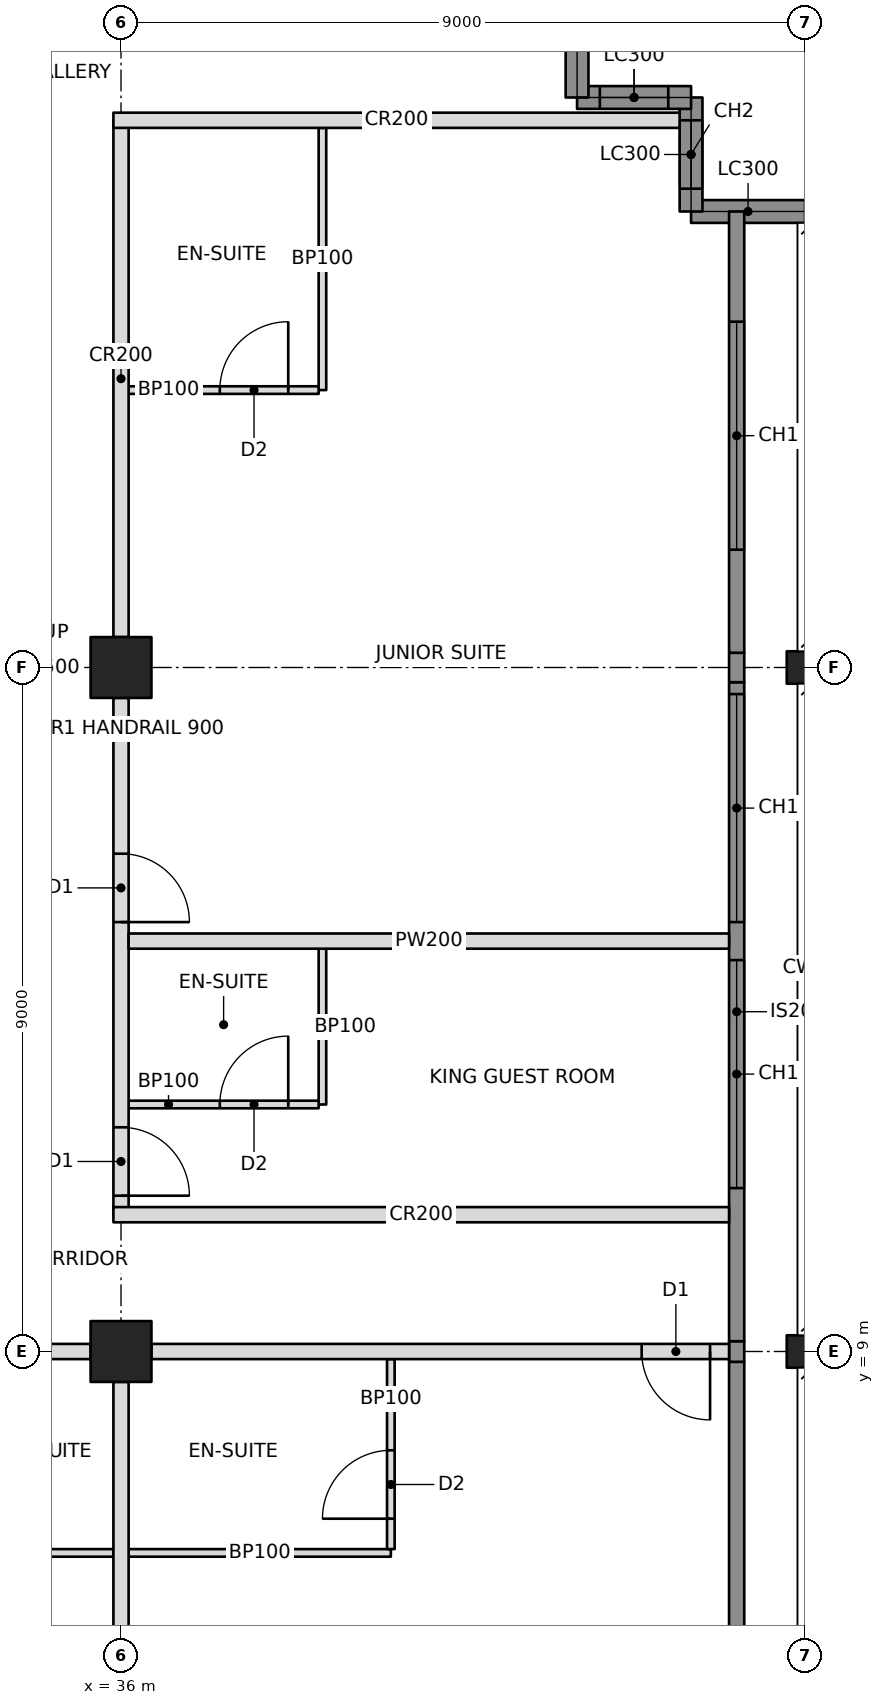
"""IFC4 building model, lengths in metres.
Left out: names, types, materials, properties, quantities, classifications, styles, units other than length and angle.
Written with IfcOpenShell. Run it as: python <this file> out.ifc"""

import sys

from ifc_helpers import new_model, si_unit, direction, frame, frame_2d, origin, origin_2d, place, context, subcontext, project, spatial, rectangle, hollow_rectangle, i_section, extrude, element, fill, save


model = new_model("IFC4")
c1 = context("Model", 3, precision=1e-05, world=origin(), true_north=direction((0.0, 1.0)))
c2 = subcontext(c1, "Body", "Model", "MODEL_VIEW")
j1 = project(units=[si_unit("LENGTHUNIT", "METRE"), si_unit("PLANEANGLEUNIT", "RADIAN")], contexts=[c1])
p1 = place(None, origin())
s1 = spatial("IfcSite", under=j1, at=p1, CompositionType="ELEMENT")
p2 = place(p1, origin())
s2 = spatial("IfcBuilding", under=s1, at=p2, CompositionType="ELEMENT")
p3 = place(p2, frame((0.0, 0.0, 208.0)))
s3 = spatial("IfcBuildingStorey", under=s2, at=p3, CompositionType="ELEMENT", Elevation=208.0)
for number, where, z_axis, x_axis in (
    (1, (36.0, 9.0, 0.0), (0.0, 0.0, 1.0), (0.0, 1.0, 0.0)),
    (2, (36.0, 18.0, 0.0), (0.0, 0.0, 1.0), (0.0, 1.0, 0.0)),
):
    element("IfcColumn", number, at=place(p3, frame(where, z_axis=z_axis, x_axis=x_axis)), inside=s3, PredefinedType="COLUMN", context=c2, shape_type="SweptSolid", body=[
        extrude(hollow_rectangle(XDim=0.8, YDim=0.8, WallThickness=0.05, at=origin_2d()), origin(), (0.0, 0.0, 1.0), 3.4),
    ])
for number, where, z_axis, x_axis in (
    (3, (45.0, 9.0, 0.0), (0.0, 0.0, 1.0), (0.0, 1.0, 0.0)),
    (4, (45.0, 18.0, 0.0), (0.0, 0.0, 1.0), (0.0, 1.0, 0.0)),
):
    element("IfcColumn", number, at=place(p3, frame(where, z_axis=z_axis, x_axis=x_axis)), inside=s3, PredefinedType="COLUMN", context=c2, shape_type="SweptSolid", body=[
        extrude(i_section(OverallWidth=0.427, OverallDepth=0.483, WebThickness=0.051, FlangeThickness=0.082, at=origin_2d()), origin(), (0.0, 0.0, 1.0), 3.4),
    ])
p4 = place(p3, frame((45.0, 24.0, 0.0), z_axis=(0.0, 0.0, 1.0), x_axis=(-1.0, 0.0, 0.0)))
e5 = element("IfcWall", 5, at=p4, inside=s3, PredefinedType="SOLIDWALL", context=c2, shape_type="SweptSolid", body=[
    extrude(rectangle(XDim=1.5, YDim=0.3, at=frame_2d((0.75, 0.0))), origin(), (0.0, 0.0, 1.0), 2.42),
])
p5 = place(p3, frame((43.5, 24.0, 0.0), z_axis=(0.0, 0.0, 1.0), x_axis=(0.0, 1.0, 0.0)))
e6 = element("IfcWall", 6, at=p5, inside=s3, PredefinedType="SOLIDWALL", context=c2, shape_type="SweptSolid", body=[
    extrude(rectangle(XDim=1.5, YDim=0.3, at=frame_2d((0.75, 0.0))), origin(), (0.0, 0.0, 1.0), 3.2),
])
p6 = place(p5, frame((0.3, 0.0, 0.6)))
e7 = element("IfcOpeningElement", 7, at=p6, cuts=e6, PredefinedType="OPENING", context=c2, shape_type="SweptSolid", body=[
    extrude(rectangle(XDim=0.9, YDim=2.2, at=frame_2d((0.45, 1.1))), frame((0.0, 0.16, 0.0), z_axis=(0.0, -1.0, 0.0), x_axis=(1.0, 0.0, 0.0)), (0.0, 0.0, 1.0), 0.32),
])
p7 = place(p3, frame((43.5, 25.5, 0.0), z_axis=(0.0, 0.0, 1.0), x_axis=(-1.0, 0.0, 0.0)))
e8 = element("IfcWall", 8, at=p7, inside=s3, PredefinedType="SOLIDWALL", context=c2, shape_type="SweptSolid", body=[
    extrude(rectangle(XDim=1.5, YDim=0.3, at=frame_2d((0.75, 0.0))), origin(), (0.0, 0.0, 1.0), 3.2),
])
p8 = place(p7, frame((0.3, 0.0, 0.6)))
e9 = element("IfcOpeningElement", 9, at=p8, cuts=e8, PredefinedType="OPENING", context=c2, shape_type="SweptSolid", body=[
    extrude(rectangle(XDim=0.9, YDim=2.2, at=frame_2d((0.45, 1.1))), frame((0.0, 0.16, 0.0), z_axis=(0.0, -1.0, 0.0), x_axis=(1.0, 0.0, 0.0)), (0.0, 0.0, 1.0), 0.32),
])
p9 = place(p3, frame((42.0, 25.5, 0.0), z_axis=(0.0, 0.0, 1.0), x_axis=(0.0, 1.0, 0.0)))
e10 = element("IfcWall", 10, at=p9, inside=s3, PredefinedType="SOLIDWALL", context=c2, shape_type="SweptSolid", body=[
    extrude(rectangle(XDim=1.5, YDim=0.3, at=frame_2d((0.75, 0.0))), origin(), (0.0, 0.0, 1.0), 2.42),
])
p10 = place(p3, frame((27.4, 9.0, 0.0), z_axis=(0.0, 0.0, 1.0), x_axis=(1.0, 0.0, 0.0)))
e11 = element("IfcWall", 11, at=p10, inside=s3, PredefinedType="PARTITIONING", context=c2, shape_type="SweptSolid", body=[
    extrude(rectangle(XDim=8.2, YDim=0.2, at=frame_2d((4.1, 0.0))), origin(), (0.0, 0.0, 1.0), 2.405),
])
p11 = place(p10, frame((4.35, 0.0, 0.0)))
e12 = element("IfcOpeningElement", 12, at=p11, cuts=e11, PredefinedType="OPENING", context=c2, shape_type="SweptSolid", body=[
    extrude(rectangle(XDim=0.9, YDim=2.1, at=frame_2d((0.45, 1.05))), frame((0.0, 0.11, 0.0), z_axis=(0.0, -1.0, 0.0), x_axis=(1.0, 0.0, 0.0)), (0.0, 0.0, 1.0), 0.22),
])
p12 = place(p3, frame((36.4, 9.0, 0.0), z_axis=(0.0, 0.0, 1.0), x_axis=(1.0, 0.0, 0.0)))
e13 = element("IfcWall", 13, at=p12, inside=s3, PredefinedType="PARTITIONING", context=c2, shape_type="SweptSolid", body=[
    extrude(rectangle(XDim=7.6, YDim=0.2, at=frame_2d((3.8, 0.0))), origin(), (0.0, 0.0, 1.0), 2.438),
])
p13 = place(p12, frame((6.45, 0.0, 0.0)))
e14 = element("IfcOpeningElement", 14, at=p13, cuts=e13, PredefinedType="OPENING", context=c2, shape_type="SweptSolid", body=[
    extrude(rectangle(XDim=0.9, YDim=2.1, at=frame_2d((0.45, 1.05))), frame((0.0, 0.11, 0.0), z_axis=(0.0, -1.0, 0.0), x_axis=(1.0, 0.0, 0.0)), (0.0, 0.0, 1.0), 0.22),
])
p14 = place(p3, frame((36.0, 10.8, 0.0), z_axis=(0.0, 0.0, 1.0), x_axis=(0.0, 1.0, 0.0)))
e15 = element("IfcWall", 15, at=p14, inside=s3, PredefinedType="PARTITIONING", context=c2, shape_type="SweptSolid", body=[
    extrude(rectangle(XDim=6.8, YDim=0.2, at=frame_2d((3.4, 0.0))), origin(), (0.0, 0.0, 1.0), 2.405),
])
p15 = place(p14, frame((0.25, 0.0, 0.0)))
e16 = element("IfcOpeningElement", 16, at=p15, cuts=e15, PredefinedType="OPENING", context=c2, shape_type="SweptSolid", body=[
    extrude(rectangle(XDim=0.9, YDim=2.1, at=frame_2d((0.45, 1.05))), frame((0.0, 0.11, 0.0), z_axis=(0.0, -1.0, 0.0), x_axis=(1.0, 0.0, 0.0)), (0.0, 0.0, 1.0), 0.22),
])
p16 = place(p14, frame((3.85, 0.0, 0.0)))
e17 = element("IfcOpeningElement", 17, at=p16, cuts=e15, PredefinedType="OPENING", context=c2, shape_type="SweptSolid", body=[
    extrude(rectangle(XDim=0.9, YDim=2.1, at=frame_2d((0.45, 1.05))), frame((0.0, 0.11, 0.0), z_axis=(0.0, -1.0, 0.0), x_axis=(1.0, 0.0, 0.0)), (0.0, 0.0, 1.0), 0.22),
])
p17 = place(p3, frame((36.0, 18.4, 0.0), z_axis=(0.0, 0.0, 1.0), x_axis=(0.0, 1.0, 0.0)))
e18 = element("IfcWall", 18, at=p17, inside=s3, PredefinedType="PARTITIONING", context=c2, shape_type="SweptSolid", body=[
    extrude(rectangle(XDim=6.8, YDim=0.2, at=frame_2d((3.4, 0.0))), origin(), (0.0, 0.0, 1.0), 2.405),
])
p18 = place(p3, frame((35.9, 10.8, 0.0), z_axis=(0.0, 0.0, 1.0), x_axis=(1.0, 0.0, 0.0)))
e19 = element("IfcWall", 19, at=p18, inside=s3, PredefinedType="PARTITIONING", context=c2, shape_type="SweptSolid", body=[
    extrude(rectangle(XDim=8.1, YDim=0.2, at=frame_2d((4.05, 0.0))), origin(), (0.0, 0.0, 1.0), 2.404),
])
p19 = place(p3, frame((35.9, 25.2, 0.0), z_axis=(0.0, 0.0, 1.0), x_axis=(1.0, 0.0, 0.0)))
e20 = element("IfcWall", 20, at=p19, inside=s3, PredefinedType="PARTITIONING", context=c2, shape_type="SweptSolid", body=[
    extrude(rectangle(XDim=7.45, YDim=0.2, at=frame_2d((3.725, 0.0))), origin(), (0.0, 0.0, 1.0), 2.404),
])
p20 = place(p3, frame((36.0, 8.6, 0.0), z_axis=(0.0, 0.0, 1.0), x_axis=(0.0, -1.0, 0.0)))
e21 = element("IfcWall", 21, at=p20, inside=s3, PredefinedType="PARTITIONING", context=c2, shape_type="SweptSolid", body=[
    extrude(rectangle(XDim=7.6, YDim=0.2, at=frame_2d((3.8, 0.0))), origin(), (0.0, 0.0, 1.0), 2.438),
])
p21 = place(p3, frame((32.95, 6.35, 0.0), z_axis=(0.0, 0.0, 1.0), x_axis=(1.0, 0.0, 0.0)))
e22 = element("IfcWall", 22, at=p21, inside=s3, PredefinedType="PARTITIONING", context=c2, shape_type="SweptSolid", body=[
    extrude(rectangle(XDim=2.95, YDim=0.1, at=frame_2d((1.475, 0.0))), origin(), (0.0, 0.0, 1.0), 2.438),
])
p22 = place(p3, frame((36.1, 6.35, 0.0), z_axis=(0.0, 0.0, 1.0), x_axis=(1.0, 0.0, 0.0)))
e23 = element("IfcWall", 23, at=p22, inside=s3, PredefinedType="PARTITIONING", context=c2, shape_type="SweptSolid", body=[
    extrude(rectangle(XDim=3.45, YDim=0.1, at=frame_2d((1.725, 0.0))), origin(), (0.0, 0.0, 1.0), 2.438),
])
p23 = place(p3, frame((39.55, 8.9, 0.0), z_axis=(0.0, 0.0, 1.0), x_axis=(0.0, -1.0, 0.0)))
e24 = element("IfcWall", 24, at=p23, inside=s3, PredefinedType="PARTITIONING", context=c2, shape_type="SweptSolid", body=[
    extrude(rectangle(XDim=2.5, YDim=0.1, at=frame_2d((1.25, 0.0))), origin(), (0.0, 0.0, 1.0), 2.438),
])
p24 = place(p23, frame((1.2, 0.0, 0.0)))
e25 = element("IfcOpeningElement", 25, at=p24, cuts=e24, PredefinedType="OPENING", context=c2, shape_type="SweptSolid", body=[
    extrude(rectangle(XDim=0.9, YDim=2.1, at=frame_2d((0.45, 1.05))), frame((0.0, 0.06, 0.0), z_axis=(0.0, -1.0, 0.0), x_axis=(1.0, 0.0, 0.0)), (0.0, 0.0, 1.0), 0.12),
])
p25 = place(p3, frame((36.1, 14.4, 0.0), z_axis=(0.0, 0.0, 1.0), x_axis=(1.0, 0.0, 0.0)))
e26 = element("IfcWall", 26, at=p25, inside=s3, PredefinedType="PARTITIONING", context=c2, shape_type="SweptSolid", body=[
    extrude(rectangle(XDim=7.9, YDim=0.2, at=frame_2d((3.95, 0.0))), origin(), (0.0, 0.0, 1.0), 2.404),
])
p26 = place(p3, frame((38.65, 12.25, 0.0), z_axis=(0.0, 0.0, 1.0), x_axis=(0.0, 1.0, 0.0)))
e27 = element("IfcWall", 27, at=p26, inside=s3, PredefinedType="PARTITIONING", context=c2, shape_type="SweptSolid", body=[
    extrude(rectangle(XDim=2.05, YDim=0.1, at=frame_2d((1.025, 0.0))), origin(), (0.0, 0.0, 1.0), 3.2),
])
p27 = place(p3, frame((36.1, 12.25, 0.0), z_axis=(0.0, 0.0, 1.0), x_axis=(1.0, 0.0, 0.0)))
e28 = element("IfcWall", 28, at=p27, inside=s3, PredefinedType="PARTITIONING", context=c2, shape_type="SweptSolid", body=[
    extrude(rectangle(XDim=2.5, YDim=0.1, at=frame_2d((1.25, 0.0))), origin(), (0.0, 0.0, 1.0), 2.404),
])
p28 = place(p27, frame((1.2, 0.0, 0.0)))
e29 = element("IfcOpeningElement", 29, at=p28, cuts=e28, PredefinedType="OPENING", context=c2, shape_type="SweptSolid", body=[
    extrude(rectangle(XDim=0.9, YDim=2.1, at=frame_2d((0.45, 1.05))), frame((0.0, 0.06, 0.0), z_axis=(0.0, -1.0, 0.0), x_axis=(1.0, 0.0, 0.0)), (0.0, 0.0, 1.0), 0.12),
])
p29 = place(p3, frame((38.65, 21.65, 0.0), z_axis=(0.0, 0.0, 1.0), x_axis=(0.0, 1.0, 0.0)))
e30 = element("IfcWall", 30, at=p29, inside=s3, PredefinedType="PARTITIONING", context=c2, shape_type="SweptSolid", body=[
    extrude(rectangle(XDim=3.45, YDim=0.1, at=frame_2d((1.725, 0.0))), origin(), (0.0, 0.0, 1.0), 3.2),
])
p30 = place(p3, frame((36.1, 21.65, 0.0), z_axis=(0.0, 0.0, 1.0), x_axis=(1.0, 0.0, 0.0)))
e31 = element("IfcWall", 31, at=p30, inside=s3, PredefinedType="PARTITIONING", context=c2, shape_type="SweptSolid", body=[
    extrude(rectangle(XDim=2.5, YDim=0.1, at=frame_2d((1.25, 0.0))), origin(), (0.0, 0.0, 1.0), 2.404),
])
p31 = place(p30, frame((1.2, 0.0, 0.0)))
e32 = element("IfcOpeningElement", 32, at=p31, cuts=e31, PredefinedType="OPENING", context=c2, shape_type="SweptSolid", body=[
    extrude(rectangle(XDim=0.9, YDim=2.1, at=frame_2d((0.45, 1.05))), frame((0.0, 0.06, 0.0), z_axis=(0.0, -1.0, 0.0), x_axis=(1.0, 0.0, 0.0)), (0.0, 0.0, 1.0), 0.12),
])
p32 = place(p3, frame((44.1, 4.607, 0.0), z_axis=(0.0, 0.0, 1.0), x_axis=(0.0, 1.0, 0.0)))
e33 = element("IfcWall", 33, at=p32, inside=s3, PredefinedType="SOLIDWALL", context=c2, shape_type="SweptSolid", body=[
    extrude(rectangle(XDim=4.257, YDim=0.2, at=frame_2d((2.129, 0.0))), origin(), (0.0, 0.0, 1.0), 3.2),
])
p33 = place(p3, frame((44.1, 8.865, 0.0), z_axis=(0.0, 0.0, 1.0), x_axis=(0.0, 1.0, 0.0)))
e34 = element("IfcWall", 34, at=p33, inside=s3, PredefinedType="SOLIDWALL", context=c2, shape_type="SweptSolid", body=[
    extrude(rectangle(XDim=0.271, YDim=0.2, at=frame_2d((0.135, 0.0))), origin(), (0.0, 0.0, 1.0), 2.438),
])
p34 = place(p3, frame((44.1, 9.135, 0.0), z_axis=(0.0, 0.0, 1.0), x_axis=(0.0, 1.0, 0.0)))
e35 = element("IfcWall", 35, at=p34, inside=s3, PredefinedType="SOLIDWALL", context=c2, shape_type="SweptSolid", body=[
    extrude(rectangle(XDim=8.671, YDim=0.2, at=frame_2d((4.335, 0.0))), origin(), (0.0, 0.0, 1.0), 3.2),
])
p35 = place(p34, frame((2.015, 0.0, 0.6)))
e36 = element("IfcOpeningElement", 36, at=p35, cuts=e35, PredefinedType="OPENING", context=c2, shape_type="SweptSolid", body=[
    extrude(rectangle(XDim=3.0, YDim=2.2, at=frame_2d((1.5, 1.1))), frame((0.0, 0.11, 0.0), z_axis=(0.0, -1.0, 0.0), x_axis=(1.0, 0.0, 0.0)), (0.0, 0.0, 1.0), 0.22),
])
p36 = place(p34, frame((5.515, 0.0, 0.6)))
e37 = element("IfcOpeningElement", 37, at=p36, cuts=e35, PredefinedType="OPENING", context=c2, shape_type="SweptSolid", body=[
    extrude(rectangle(XDim=3.0, YDim=2.2, at=frame_2d((1.5, 1.1))), frame((0.0, 0.11, 0.0), z_axis=(0.0, -1.0, 0.0), x_axis=(1.0, 0.0, 0.0)), (0.0, 0.0, 1.0), 0.22),
])
p37 = place(p3, frame((44.1, 17.806, 0.0), z_axis=(0.0, 0.0, 1.0), x_axis=(0.0, 1.0, 0.0)))
e38 = element("IfcWall", 38, at=p37, inside=s3, PredefinedType="SOLIDWALL", context=c2, shape_type="SweptSolid", body=[
    extrude(rectangle(XDim=0.388, YDim=0.2, at=frame_2d((0.194, 0.0))), origin(), (0.0, 0.0, 1.0), 2.404),
])
p38 = place(p3, frame((44.1, 18.194, 0.0), z_axis=(0.0, 0.0, 1.0), x_axis=(0.0, 1.0, 0.0)))
e39 = element("IfcWall", 39, at=p38, inside=s3, PredefinedType="SOLIDWALL", context=c2, shape_type="SweptSolid", body=[
    extrude(rectangle(XDim=5.806, YDim=0.2, at=frame_2d((2.903, 0.0))), origin(), (0.0, 0.0, 1.0), 3.2),
])
p39 = place(p38, frame((1.356, 0.0, 0.6)))
e40 = element("IfcOpeningElement", 40, at=p39, cuts=e39, PredefinedType="OPENING", context=c2, shape_type="SweptSolid", body=[
    extrude(rectangle(XDim=3.0, YDim=2.2, at=frame_2d((1.5, 1.1))), frame((0.0, 0.11, 0.0), z_axis=(0.0, -1.0, 0.0), x_axis=(1.0, 0.0, 0.0)), (0.0, 0.0, 1.0), 0.22),
])
p40 = place(p6, origin())
e41 = element("IfcWindow", 41, at=p40, inside=s3, PartitioningType="SINGLE_PANEL", PredefinedType="WINDOW", context=c2, shape_type="SweptSolid", body=[
    extrude(rectangle(XDim=0.9, YDim=2.2, at=frame_2d((0.45, 1.1))), frame((0.0, 0.03, 0.0), z_axis=(0.0, -1.0, 0.0), x_axis=(1.0, 0.0, 0.0)), (0.0, 0.0, 1.0), 0.06),
])
fill(e7, e41)
p41 = place(p8, origin())
e42 = element("IfcWindow", 42, at=p41, inside=s3, PartitioningType="SINGLE_PANEL", PredefinedType="WINDOW", context=c2, shape_type="SweptSolid", body=[
    extrude(rectangle(XDim=0.9, YDim=2.2, at=frame_2d((0.45, 1.1))), frame((0.0, 0.03, 0.0), z_axis=(0.0, -1.0, 0.0), x_axis=(1.0, 0.0, 0.0)), (0.0, 0.0, 1.0), 0.06),
])
fill(e9, e42)
p42 = place(p35, origin())
e43 = element("IfcWindow", 43, at=p42, inside=s3, PartitioningType="TRIPLE_PANEL_VERTICAL", PredefinedType="WINDOW", context=c2, shape_type="SweptSolid", body=[
    extrude(rectangle(XDim=3.0, YDim=2.2, at=frame_2d((1.5, 1.1))), frame((0.0, 0.03, 0.0), z_axis=(0.0, -1.0, 0.0), x_axis=(1.0, 0.0, 0.0)), (0.0, 0.0, 1.0), 0.06),
])
fill(e36, e43)
p43 = place(p36, origin())
e44 = element("IfcWindow", 44, at=p43, inside=s3, PartitioningType="TRIPLE_PANEL_VERTICAL", PredefinedType="WINDOW", context=c2, shape_type="SweptSolid", body=[
    extrude(rectangle(XDim=3.0, YDim=2.2, at=frame_2d((1.5, 1.1))), frame((0.0, 0.03, 0.0), z_axis=(0.0, -1.0, 0.0), x_axis=(1.0, 0.0, 0.0)), (0.0, 0.0, 1.0), 0.06),
])
fill(e37, e44)
p44 = place(p39, origin())
e45 = element("IfcWindow", 45, at=p44, inside=s3, PartitioningType="TRIPLE_PANEL_VERTICAL", PredefinedType="WINDOW", context=c2, shape_type="SweptSolid", body=[
    extrude(rectangle(XDim=3.0, YDim=2.2, at=frame_2d((1.5, 1.1))), frame((0.0, 0.03, 0.0), z_axis=(0.0, -1.0, 0.0), x_axis=(1.0, 0.0, 0.0)), (0.0, 0.0, 1.0), 0.06),
])
fill(e40, e45)
p45 = place(p24, frame((0.9, 0.0, 0.0), z_axis=(0.0, 0.0, 1.0), x_axis=(-1.0, 0.0, 0.0)))
e46 = element("IfcDoor", 46, at=p45, inside=s3, OperationType="SINGLE_SWING_LEFT", PredefinedType="DOOR", context=c2, shape_type="SweptSolid", body=[
    extrude(rectangle(XDim=0.9, YDim=2.1, at=frame_2d((0.45, 1.05))), frame((0.0, 0.025, 0.0), z_axis=(0.0, -1.0, 0.0), x_axis=(1.0, 0.0, 0.0)), (0.0, 0.0, 1.0), 0.05),
])
fill(e25, e46)
p46 = place(p13, frame((0.9, 0.0, 0.0), z_axis=(0.0, 0.0, 1.0), x_axis=(-1.0, 0.0, 0.0)))
e47 = element("IfcDoor", 47, at=p46, inside=s3, OperationType="SINGLE_SWING_LEFT", PredefinedType="DOOR", context=c2, shape_type="SweptSolid", body=[
    extrude(rectangle(XDim=0.9, YDim=2.1, at=frame_2d((0.45, 1.05))), frame((0.0, 0.025, 0.0), z_axis=(0.0, -1.0, 0.0), x_axis=(1.0, 0.0, 0.0)), (0.0, 0.0, 1.0), 0.05),
])
fill(e14, e47)
p47 = place(p28, origin())
e48 = element("IfcDoor", 48, at=p47, inside=s3, OperationType="SINGLE_SWING_RIGHT", PredefinedType="DOOR", context=c2, shape_type="SweptSolid", body=[
    extrude(rectangle(XDim=0.9, YDim=2.1, at=frame_2d((0.45, 1.05))), frame((0.0, 0.025, 0.0), z_axis=(0.0, -1.0, 0.0), x_axis=(1.0, 0.0, 0.0)), (0.0, 0.0, 1.0), 0.05),
])
fill(e29, e48)
p48 = place(p15, frame((0.9, 0.0, 0.0), z_axis=(0.0, 0.0, 1.0), x_axis=(-1.0, 0.0, 0.0)))
e49 = element("IfcDoor", 49, at=p48, inside=s3, OperationType="SINGLE_SWING_RIGHT", PredefinedType="DOOR", context=c2, shape_type="SweptSolid", body=[
    extrude(rectangle(XDim=0.9, YDim=2.1, at=frame_2d((0.45, 1.05))), frame((0.0, 0.025, 0.0), z_axis=(0.0, -1.0, 0.0), x_axis=(1.0, 0.0, 0.0)), (0.0, 0.0, 1.0), 0.05),
])
fill(e16, e49)
p49 = place(p31, origin())
e50 = element("IfcDoor", 50, at=p49, inside=s3, OperationType="SINGLE_SWING_RIGHT", PredefinedType="DOOR", context=c2, shape_type="SweptSolid", body=[
    extrude(rectangle(XDim=0.9, YDim=2.1, at=frame_2d((0.45, 1.05))), frame((0.0, 0.025, 0.0), z_axis=(0.0, -1.0, 0.0), x_axis=(1.0, 0.0, 0.0)), (0.0, 0.0, 1.0), 0.05),
])
fill(e32, e50)
p50 = place(p16, frame((0.9, 0.0, 0.0), z_axis=(0.0, 0.0, 1.0), x_axis=(-1.0, 0.0, 0.0)))
e51 = element("IfcDoor", 51, at=p50, inside=s3, OperationType="SINGLE_SWING_RIGHT", PredefinedType="DOOR", context=c2, shape_type="SweptSolid", body=[
    extrude(rectangle(XDim=0.9, YDim=2.1, at=frame_2d((0.45, 1.05))), frame((0.0, 0.025, 0.0), z_axis=(0.0, -1.0, 0.0), x_axis=(1.0, 0.0, 0.0)), (0.0, 0.0, 1.0), 0.05),
])
fill(e17, e51)
save(model, sys.argv[1])
